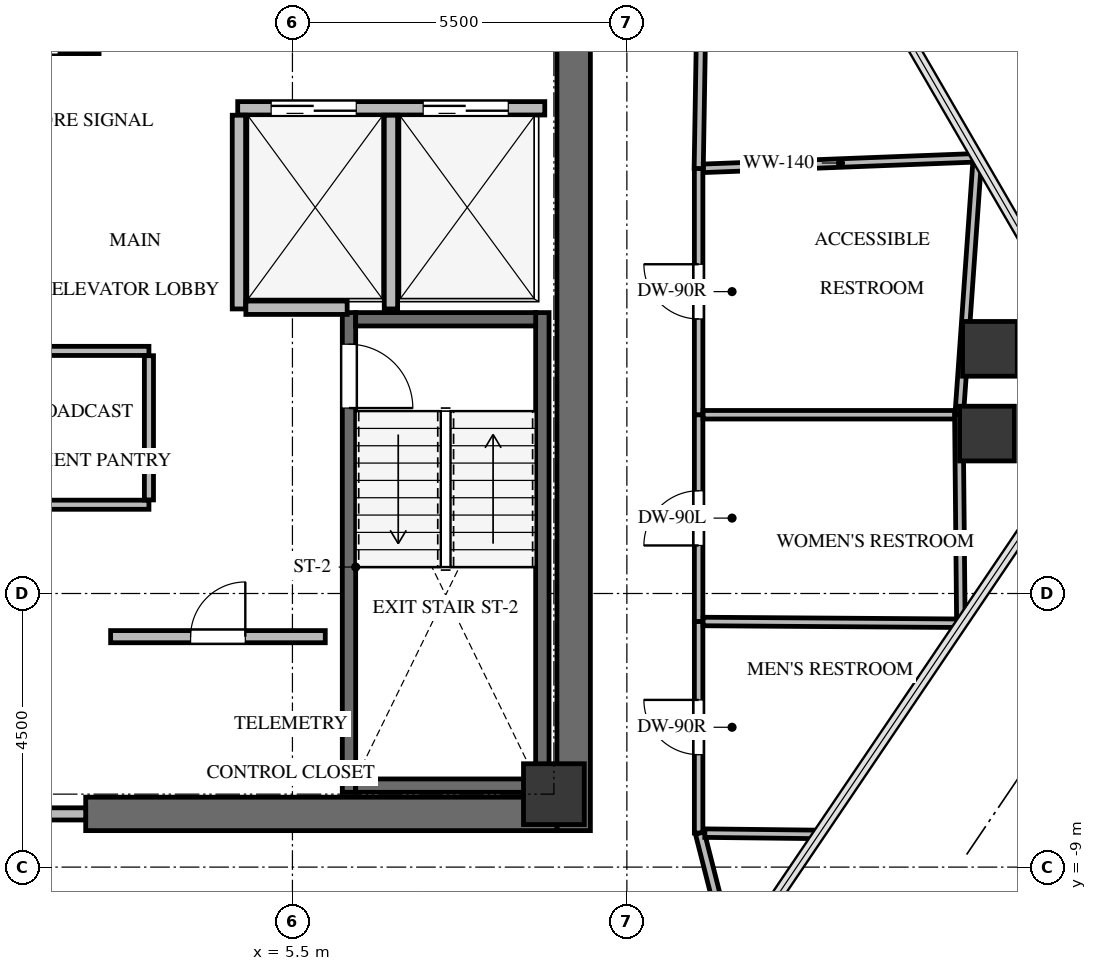
"""IFC4 building model, lengths in metres.
Left out: names, types, materials, properties, quantities, classifications, styles, units other than length and angle.
Written with IfcOpenShell. Run it as: python <this file> out.ifc"""

import sys

from ifc_helpers import new_model, si_unit, direction, frame, frame_2d, origin, origin_2d, place, context, subcontext, project, spatial, rectangle, extrude, source, transform, mapped, element, fill, save


model = new_model("IFC4")
c1 = context("Model", 3, precision=1e-05, world=origin(), true_north=direction((0.0, 1.0)))
c2 = subcontext(c1, "Body", "Model", "MODEL_VIEW")
j1 = project(units=[si_unit("LENGTHUNIT", "METRE"), si_unit("PLANEANGLEUNIT", "RADIAN")], contexts=[c1])
p1 = place(None, origin())
s1 = spatial("IfcSite", under=j1, at=p1, CompositionType="ELEMENT")
p2 = place(p1, origin())
s2 = spatial("IfcBuilding", under=s1, at=p2, CompositionType="ELEMENT")
p3 = place(p2, frame((0.0, 0.0, 221.6)))
s3 = spatial("IfcBuildingStorey", under=s2, at=p3, CompositionType="ELEMENT", Elevation=221.6)
p4 = place(p3, frame((10.125, -8.4, 0.0), z_axis=(0.0, 0.0, 1.0), x_axis=(0.0, 1.0, 0.0)))
e1 = element("IfcWall", 1, at=p4, inside=s3, PredefinedType="SHEAR", context=c2, shape_type="SweptSolid", body=[
    extrude(rectangle(XDim=16.8, YDim=0.55, at=frame_2d((8.4, 0.0))), origin(), (0.0, 0.0, 1.0), 3.3),
])
p5 = place(p3, frame((2.1, -8.125, 0.0), z_axis=(0.0, 0.0, 1.0), x_axis=(1.0, 0.0, 0.0)))
e2 = element("IfcWall", 2, at=p5, inside=s3, PredefinedType="SHEAR", context=c2, shape_type="SweptSolid", body=[
    extrude(rectangle(XDim=7.75, YDim=0.55, at=frame_2d((3.875, 0.0))), origin(), (0.0, 0.0, 1.0), 3.3),
])
p6 = place(p3, frame((9.61, -7.77, -0.24), z_axis=(0.0, 0.0, 1.0), x_axis=(0.0, 1.0, 0.0)))
e3 = element("IfcWall", 3, at=p6, inside=s3, PredefinedType="SHEAR", context=c2, shape_type="SweptSolid", body=[
    extrude(rectangle(XDim=7.89, YDim=0.22, at=frame_2d((3.945, 0.0))), origin(), (0.0, 0.0, 1.0), 3.3),
])
p7 = place(p3, frame((6.43, 0.12, -0.24), z_axis=(0.0, 0.0, 1.0), x_axis=(0.0, -1.0, 0.0)))
e4 = element("IfcWall", 4, at=p7, inside=s3, PredefinedType="SHEAR", context=c2, shape_type="SweptSolid", body=[
    extrude(rectangle(XDim=7.89, YDim=0.22, at=frame_2d((3.945, 0.0))), origin(), (0.0, 0.0, 1.0), 3.3),
])
p8 = place(p7, frame((0.52, 0.0, 0.0)))
e5 = element("IfcOpeningElement", 5, at=p8, cuts=e4, PredefinedType="OPENING", context=c2, shape_type="SweptSolid", body=[
    extrude(rectangle(XDim=1.05, YDim=2.15, at=frame_2d((0.525, 1.075))), frame((0.0, 0.12, 0.0), z_axis=(0.0, -1.0, 0.0), x_axis=(1.0, 0.0, 0.0)), (0.0, 0.0, 1.0), 0.24),
])
for number, where, z_axis, x_axis in (
    (6, (6.54, -7.66, -0.24), (0.0, 0.0, 1.0), (1.0, 0.0, 0.0)),
    (7, (9.5, 0.01, -0.24), (0.0, 0.0, 1.0), (-1.0, 0.0, 0.0)),
):
    element("IfcWall", number, at=place(p3, frame(where, z_axis=z_axis, x_axis=x_axis)), inside=s3, PredefinedType="SHEAR", context=c2, shape_type="SweptSolid", body=[
        extrude(rectangle(XDim=2.96, YDim=0.22, at=frame_2d((1.48, 0.0))), origin(), (0.0, 0.0, 1.0), 3.3),
    ])
p9 = place(p3, frame((2.21, 4.38, -0.24), z_axis=(0.0, 0.0, 1.0), x_axis=(0.0, 1.0, 0.0)))
e8 = element("IfcWall", 8, at=p9, inside=s3, PredefinedType="SHEAR", context=c2, shape_type="SweptSolid", body=[
    extrude(rectangle(XDim=3.4, YDim=0.22, at=frame_2d((1.7, 0.0))), origin(), (0.0, 0.0, 1.0), 3.3),
])
p10 = place(p3, frame((-5.25, 4.49, -0.24), z_axis=(0.0, 0.0, 1.0), x_axis=(1.0, 0.0, 0.0)))
e9 = element("IfcWall", 9, at=p10, inside=s3, PredefinedType="SHEAR", context=c2, shape_type="SweptSolid", body=[
    extrude(rectangle(XDim=7.35, YDim=0.22, at=frame_2d((3.675, 0.0))), origin(), (0.0, 0.0, 1.0), 3.3),
])
p11 = place(p10, frame((5.85, 0.0, 0.0)))
e10 = element("IfcOpeningElement", 10, at=p11, cuts=e9, PredefinedType="OPENING", context=c2, shape_type="SweptSolid", body=[
    extrude(rectangle(XDim=1.05, YDim=2.15, at=frame_2d((0.525, 1.075))), frame((0.0, 0.12, 0.0), z_axis=(0.0, -1.0, 0.0), x_axis=(1.0, 0.0, 0.0)), (0.0, 0.0, 1.0), 0.24),
])
m1 = source(origin(), c2, "Body", "SweptSolid", [
    extrude(rectangle(XDim=1.0, YDim=1.0, at=origin_2d()), origin(), (0.0, 0.0, 1.0), 3.3),
])
p12 = place(p3, frame((9.8, -7.8, -0.24), z_axis=(0.0, 0.0, 1.0), x_axis=(1.0, 0.0, 0.0)))
e11 = element("IfcColumn", 11, at=p12, inside=s3, PredefinedType="COLUMN", context=c2, shape_type="MappedRepresentation", body=[
    mapped(m1, transform((0.0, 0.0, 0.0), x_axis=(1.0, 0.0, 0.0), y_axis=(0.0, 1.0, 0.0), z_axis=(0.0, 0.0, 1.0), scale=1.0)),
])
m2 = source(origin(), c2, "Body", "SweptSolid", [
    extrude(rectangle(XDim=0.9, YDim=0.9, at=origin_2d()), origin(), (0.0, 0.0, 1.0), 3.3),
])
for number, where, z_axis, x_axis in (
    (12, (16.97, -0.476, -0.24), (0.0, 0.0, 1.0), (1.0, 0.0, 0.0)),
    (13, (16.922, -1.87, -0.24), (0.0, 0.0, 1.0), (1.0, 0.0, 0.0)),
):
    element("IfcColumn", number, at=place(p3, frame(where, z_axis=z_axis, x_axis=x_axis)), inside=s3, PredefinedType="COLUMN", context=c2, shape_type="MappedRepresentation", body=[
        mapped(m2, transform((0.0, 0.0, 0.0), x_axis=(1.0, 0.0, 0.0), y_axis=(0.0, 1.0, 0.0), z_axis=(0.0, 0.0, 1.0), scale=1.0)),
    ])
p13 = place(p3, frame((-2.1, -8.125, 0.0), z_axis=(0.0, 0.0, 1.0), x_axis=(1.0, 0.0, 0.0)))
e14 = element("IfcWall", 14, at=p13, inside=s3, PredefinedType="SOLIDWALL", context=c2, shape_type="SweptSolid", body=[
    extrude(rectangle(XDim=4.2, YDim=0.2, at=frame_2d((2.1, 0.0))), origin(), (0.0, 0.0, 1.0), 3.045),
])
p14 = place(p13, frame((1.2, 0.0, 0.0)))
e15 = element("IfcOpeningElement", 15, at=p14, cuts=e14, PredefinedType="OPENING", context=c2, shape_type="SweptSolid", body=[
    extrude(rectangle(XDim=1.8, YDim=2.15, at=frame_2d((0.9, 1.075))), frame((0.0, 0.11, 0.0), z_axis=(0.0, -1.0, 0.0), x_axis=(1.0, 0.0, 0.0)), (0.0, 0.0, 1.0), 0.22),
])
p15 = place(p3, frame((4.6, 3.48, 0.0), z_axis=(0.0, 0.0, 1.0), x_axis=(1.0, 0.0, 0.0)))
e16 = element("IfcWall", 16, at=p15, inside=s3, PredefinedType="SOLIDWALL", context=c2, shape_type="SweptSolid", body=[
    extrude(rectangle(XDim=5.05, YDim=0.22, at=frame_2d((2.525, 0.0))), origin(), (0.0, 0.0, 1.0), 3.045),
])
p16 = place(p15, frame((0.55, 0.0, 0.0)))
e17 = element("IfcOpeningElement", 17, at=p16, cuts=e16, PredefinedType="OPENING", context=c2, shape_type="SweptSolid", body=[
    extrude(rectangle(XDim=1.4, YDim=2.15, at=frame_2d((0.7, 1.075))), frame((0.0, 0.12, 0.0), z_axis=(0.0, -1.0, 0.0), x_axis=(1.0, 0.0, 0.0)), (0.0, 0.0, 1.0), 0.24),
])
p17 = place(p15, frame((3.05, 0.0, 0.0)))
e18 = element("IfcOpeningElement", 18, at=p17, cuts=e16, PredefinedType="OPENING", context=c2, shape_type="SweptSolid", body=[
    extrude(rectangle(XDim=1.4, YDim=2.15, at=frame_2d((0.7, 1.075))), frame((0.0, 0.12, 0.0), z_axis=(0.0, -1.0, 0.0), x_axis=(1.0, 0.0, 0.0)), (0.0, 0.0, 1.0), 0.24),
])
for number, where, z_axis, x_axis in (
    (19, (4.62, 0.18, 0.0), (0.0, 0.0, 1.0), (0.0, 1.0, 0.0)),
    (20, (7.12, 0.18, 0.0), (0.0, 0.0, 1.0), (0.0, 1.0, 0.0)),
):
    element("IfcWall", number, at=place(p3, frame(where, z_axis=z_axis, x_axis=x_axis)), inside=s3, PredefinedType="SOLIDWALL", context=c2, shape_type="SweptSolid", body=[
        extrude(rectangle(XDim=3.186, YDim=0.22, at=frame_2d((1.593, 0.0))), origin(), (0.0, 0.0, 1.0), 3.045),
    ])
p18 = place(p3, frame((4.734, 0.2, 0.0), z_axis=(0.0, 0.0, 1.0), x_axis=(1.0, 0.0, 0.0)))
e21 = element("IfcWall", 21, at=p18, inside=s3, PredefinedType="SOLIDWALL", context=c2, shape_type="SweptSolid", body=[
    extrude(rectangle(XDim=1.666, YDim=0.22, at=frame_2d((0.833, 0.0))), origin(), (0.0, 0.0, 1.0), 3.045),
])
p19 = place(p3, frame((2.51, -5.21, 0.0), z_axis=(0.0, 0.0, 1.0), x_axis=(1.0, 0.0, 0.0)))
e22 = element("IfcWall", 22, at=p19, inside=s3, PredefinedType="SOLIDWALL", context=c2, shape_type="SweptSolid", body=[
    extrude(rectangle(XDim=3.53, YDim=0.2, at=frame_2d((1.765, 0.0))), origin(), (0.0, 0.0, 1.0), 3.045),
])
p20 = place(p19, frame((1.315, 0.0, 0.0)))
e23 = element("IfcOpeningElement", 23, at=p20, cuts=e22, PredefinedType="OPENING", context=c2, shape_type="SweptSolid", body=[
    extrude(rectangle(XDim=0.9, YDim=2.05, at=frame_2d((0.45, 1.025))), frame((0.0, 0.11, 0.0), z_axis=(0.0, -1.0, 0.0), x_axis=(1.0, 0.0, 0.0)), (0.0, 0.0, 1.0), 0.22),
])
p21 = place(p3, frame((3.14, -3.04, 0.0), z_axis=(0.0, 0.0, 1.0), x_axis=(-1.0, 0.0, 0.0)))
e24 = element("IfcWall", 24, at=p21, inside=s3, PredefinedType="PARTITIONING", context=c2, shape_type="SweptSolid", body=[
    extrude(rectangle(XDim=7.48, YDim=0.15, at=frame_2d((3.74, 0.0))), origin(), (0.0, 0.0, 1.0), 3.045),
])
p22 = place(p21, frame((3.29, 0.0, 0.0)))
e25 = element("IfcOpeningElement", 25, at=p22, cuts=e24, PredefinedType="OPENING", context=c2, shape_type="SweptSolid", body=[
    extrude(rectangle(XDim=0.9, YDim=2.05, at=frame_2d((0.45, 1.025))), frame((0.0, 0.085, 0.0), z_axis=(0.0, -1.0, 0.0), x_axis=(1.0, 0.0, 0.0)), (0.0, 0.0, 1.0), 0.17),
])
p23 = place(p3, frame((-4.34, -0.51, 0.0), z_axis=(0.0, 0.0, 1.0), x_axis=(1.0, 0.0, 0.0)))
e26 = element("IfcWall", 26, at=p23, inside=s3, PredefinedType="PARTITIONING", context=c2, shape_type="SweptSolid", body=[
    extrude(rectangle(XDim=7.48, YDim=0.15, at=frame_2d((3.74, 0.0))), origin(), (0.0, 0.0, 1.0), 3.045),
])
p24 = place(p3, frame((3.14, -0.589, 0.0), z_axis=(0.0, 0.0, 1.0), x_axis=(0.0, -1.0, 0.0)))
e27 = element("IfcWall", 27, at=p24, inside=s3, PredefinedType="PARTITIONING", context=c2, shape_type="SweptSolid", body=[
    extrude(rectangle(XDim=2.372, YDim=0.15, at=frame_2d((1.186, 0.0))), origin(), (0.0, 0.0, 1.0), 3.045),
])
p25 = place(p3, frame((12.18, -8.44, 0.0), z_axis=(0.0, 0.0, 1.0), x_axis=(0.0, 1.0, 0.0)))
e28 = element("IfcWall", 28, at=p25, inside=s3, PredefinedType="PARTITIONING", context=c2, shape_type="SweptSolid", body=[
    extrude(rectangle(XDim=3.48, YDim=0.14, at=frame_2d((1.74, 0.0))), origin(), (0.0, 0.0, 1.0), 2.399),
])
p26 = place(p25, frame((1.29, 0.0, 0.0)))
e29 = element("IfcOpeningElement", 29, at=p26, cuts=e28, PredefinedType="OPENING", context=c2, shape_type="SweptSolid", body=[
    extrude(rectangle(XDim=0.9, YDim=2.05, at=frame_2d((0.45, 1.025))), frame((0.0, 0.08, 0.0), z_axis=(0.0, -1.0, 0.0), x_axis=(1.0, 0.0, 0.0)), (0.0, 0.0, 1.0), 0.16),
])
p27 = place(p3, frame((12.18, -4.96, 0.0), z_axis=(0.0, 0.0, 1.0), x_axis=(0.0, 1.0, 0.0)))
e30 = element("IfcWall", 30, at=p27, inside=s3, PredefinedType="PARTITIONING", context=c2, shape_type="SweptSolid", body=[
    extrude(rectangle(XDim=3.4, YDim=0.14, at=frame_2d((1.7, 0.0))), origin(), (0.0, 0.0, 1.0), 3.045),
])
p28 = place(p27, frame((1.25, 0.0, 0.0)))
e31 = element("IfcOpeningElement", 31, at=p28, cuts=e30, PredefinedType="OPENING", context=c2, shape_type="SweptSolid", body=[
    extrude(rectangle(XDim=0.9, YDim=2.05, at=frame_2d((0.45, 1.025))), frame((0.0, 0.08, 0.0), z_axis=(0.0, -1.0, 0.0), x_axis=(1.0, 0.0, 0.0)), (0.0, 0.0, 1.0), 0.16),
])
p29 = place(p3, frame((12.18, -1.56, 0.0), z_axis=(0.0, 0.0, 1.0), x_axis=(0.0, 1.0, 0.0)))
e32 = element("IfcWall", 32, at=p29, inside=s3, PredefinedType="PARTITIONING", context=c2, shape_type="SweptSolid", body=[
    extrude(rectangle(XDim=4.05, YDim=0.14, at=frame_2d((2.025, 0.0))), origin(), (0.0, 0.0, 1.0), 2.301),
])
p30 = place(p29, frame((1.575, 0.0, 0.0)))
e33 = element("IfcOpeningElement", 33, at=p30, cuts=e32, PredefinedType="OPENING", context=c2, shape_type="SweptSolid", body=[
    extrude(rectangle(XDim=0.9, YDim=2.05, at=frame_2d((0.45, 1.025))), frame((0.0, 0.08, 0.0), z_axis=(0.0, -1.0, 0.0), x_axis=(1.0, 0.0, 0.0)), (0.0, 0.0, 1.0), 0.16),
])
p31 = place(p3, frame((12.719, -10.478, 0.0), z_axis=(0.0, 0.0, 1.0), x_axis=(-0.246494896578, 0.96914408937, 0.0)))
e34 = element("IfcWall", 34, at=p31, inside=s3, PredefinedType="PARTITIONING", context=c2, shape_type="SweptSolid", body=[
    extrude(rectangle(XDim=2.103, YDim=0.15, at=frame_2d((1.051, 0.0))), origin(), (0.0, 0.0, 1.0), 2.399),
])
p32 = place(p3, frame((12.181, 2.49, 0.0), z_axis=(0.0, 0.0, 1.0), x_axis=(0.016828134389, 0.999858396921, 0.0)))
e35 = element("IfcWall", 35, at=p32, inside=s3, PredefinedType="PARTITIONING", context=c2, shape_type="SweptSolid", body=[
    extrude(rectangle(XDim=7.675, YDim=0.15, at=frame_2d((3.837, 0.0))), origin(), (0.0, 0.0, 1.0), 2.399),
])
p33 = place(p32, frame((3.377, 0.0, 0.0)))
e36 = element("IfcOpeningElement", 36, at=p33, cuts=e35, PredefinedType="OPENING", context=c2, shape_type="SweptSolid", body=[
    extrude(rectangle(XDim=0.92, YDim=2.1, at=frame_2d((0.46, 1.05))), frame((0.0, 0.085, 0.0), z_axis=(0.0, -1.0, 0.0), x_axis=(1.0, 0.0, 0.0)), (0.0, 0.0, 1.0), 0.17),
])
p34 = place(p3, frame((12.254, -4.96, 0.0), z_axis=(0.0, 0.0, 1.0), x_axis=(0.999976630429, -0.006836563198, 0.0)))
e37 = element("IfcWall", 37, at=p34, inside=s3, PredefinedType="PARTITIONING", context=c2, shape_type="SweptSolid", body=[
    extrude(rectangle(XDim=4.25, YDim=0.14, at=frame_2d((2.125, 0.0))), origin(), (0.0, 0.0, 1.0), 2.399),
])
p35 = place(p3, frame((14.156, -8.462, 0.0), z_axis=(0.0, 0.0, 1.0), x_axis=(-0.999935742613, 0.011336253532, 0.0)))
e38 = element("IfcWall", 38, at=p35, inside=s3, PredefinedType="PARTITIONING", context=c2, shape_type="SweptSolid", body=[
    extrude(rectangle(XDim=1.874, YDim=0.14, at=frame_2d((0.937, 0.0))), origin(), (0.0, 0.0, 1.0), 2.399),
])
p36 = place(p3, frame((12.254, -1.56, 0.0), z_axis=(0.0, 0.0, 1.0), x_axis=(1.0, 0.0, 0.0)))
e39 = element("IfcWall", 39, at=p36, inside=s3, PredefinedType="PARTITIONING", context=c2, shape_type="SweptSolid", body=[
    extrude(rectangle(XDim=4.206, YDim=0.14, at=frame_2d((2.103, 0.0))), origin(), (0.0, 0.0, 1.0), 2.301),
])
p37 = place(p3, frame((16.46, -1.56, 0.0), z_axis=(0.0, 0.0, 1.0), x_axis=(0.009604446748, -0.999953876238, 0.0)))
e40 = element("IfcWall", 40, at=p37, inside=s3, PredefinedType="PARTITIONING", context=c2, shape_type="SweptSolid", body=[
    extrude(rectangle(XDim=3.355, YDim=0.14, at=frame_2d((1.678, 0.0))), origin(), (0.0, 0.0, 1.0), 2.301),
])
p38 = place(p3, frame((12.26, 2.493, 0.0), z_axis=(0.0, 0.0, 1.0), x_axis=(0.999256206289, 0.038562082324, 0.0)))
e41 = element("IfcWall", 41, at=p38, inside=s3, PredefinedType="PARTITIONING", context=c2, shape_type="SweptSolid", body=[
    extrude(rectangle(XDim=4.508, YDim=0.14, at=frame_2d((2.254, 0.0))), origin(), (0.0, 0.0, 1.0), 2.399),
])
p39 = place(p3, frame((16.76, 2.593, 0.0), z_axis=(0.0, 0.0, 1.0), x_axis=(-0.07055102187, -0.997508172053, 0.0)))
e42 = element("IfcWall", 42, at=p39, inside=s3, PredefinedType="PARTITIONING", context=c2, shape_type="SweptSolid", body=[
    extrude(rectangle(XDim=4.163, YDim=0.14, at=frame_2d((2.082, 0.0))), origin(), (0.0, 0.0, 1.0), 2.301),
])
m3 = source(origin(), c2, "Body", "SweptSolid", [
    extrude(rectangle(XDim=1.05, YDim=2.15, at=frame_2d((0.525, 1.075))), frame((0.0, 0.025, 0.0), z_axis=(0.0, -1.0, 0.0), x_axis=(1.0, 0.0, 0.0)), (0.0, 0.0, 1.0), 0.05),
])
p40 = place(p8, origin())
e43 = element("IfcDoor", 43, at=p40, inside=s3, OperationType="SINGLE_SWING_RIGHT", PredefinedType="DOOR", context=c2, shape_type="MappedRepresentation", body=[
    mapped(m3, transform((0.0, 0.0, 0.0), x_axis=(1.0, 0.0, 0.0), y_axis=(0.0, 1.0, 0.0), z_axis=(0.0, 0.0, 1.0), scale=1.0)),
])
fill(e5, e43)
m4 = source(origin(), c2, "Body", "SweptSolid", [
    extrude(rectangle(XDim=1.4, YDim=2.15, at=frame_2d((0.7, 1.075))), frame((0.0, 0.025, 0.0), z_axis=(0.0, -1.0, 0.0), x_axis=(1.0, 0.0, 0.0)), (0.0, 0.0, 1.0), 0.05),
])
p41 = place(p16, origin())
e44 = element("IfcDoor", 44, at=p41, inside=s3, OperationType="DOUBLE_DOOR_SLIDING", PredefinedType="DOOR", context=c2, shape_type="MappedRepresentation", body=[
    mapped(m4, transform((0.0, 0.0, 0.0), x_axis=(1.0, 0.0, 0.0), y_axis=(0.0, 1.0, 0.0), z_axis=(0.0, 0.0, 1.0), scale=1.0)),
])
fill(e17, e44)
p42 = place(p17, origin())
e45 = element("IfcDoor", 45, at=p42, inside=s3, OperationType="DOUBLE_DOOR_SLIDING", PredefinedType="DOOR", context=c2, shape_type="MappedRepresentation", body=[
    mapped(m4, transform((0.0, 0.0, 0.0), x_axis=(1.0, 0.0, 0.0), y_axis=(0.0, 1.0, 0.0), z_axis=(0.0, 0.0, 1.0), scale=1.0)),
])
fill(e18, e45)
m5 = source(origin(), c2, "Body", "SweptSolid", [
    extrude(rectangle(XDim=0.9, YDim=2.05, at=frame_2d((0.45, 1.025))), frame((0.0, 0.025, 0.0), z_axis=(0.0, -1.0, 0.0), x_axis=(1.0, 0.0, 0.0)), (0.0, 0.0, 1.0), 0.05),
])
p43 = place(p20, origin())
e46 = element("IfcDoor", 46, at=p43, inside=s3, OperationType="SINGLE_SWING_RIGHT", PredefinedType="DOOR", context=c2, shape_type="MappedRepresentation", body=[
    mapped(m5, transform((0.0, 0.0, 0.0), x_axis=(1.0, 0.0, 0.0), y_axis=(0.0, 1.0, 0.0), z_axis=(0.0, 0.0, 1.0), scale=1.0)),
])
fill(e23, e46)
m6 = source(origin(), c2, "Body", "SweptSolid", [
    extrude(rectangle(XDim=0.9, YDim=2.05, at=frame_2d((0.45, 1.025))), frame((0.0, 0.025, 0.0), z_axis=(0.0, -1.0, 0.0), x_axis=(1.0, 0.0, 0.0)), (0.0, 0.0, 1.0), 0.05),
])
p44 = place(p26, origin())
e47 = element("IfcDoor", 47, at=p44, inside=s3, OperationType="SINGLE_SWING_RIGHT", PredefinedType="DOOR", context=c2, shape_type="MappedRepresentation", body=[
    mapped(m6, transform((0.0, 0.0, 0.0), x_axis=(1.0, 0.0, 0.0), y_axis=(0.0, 1.0, 0.0), z_axis=(0.0, 0.0, 1.0), scale=1.0)),
])
fill(e29, e47)
m7 = source(origin(), c2, "Body", "SweptSolid", [
    extrude(rectangle(XDim=0.9, YDim=2.05, at=frame_2d((0.45, 1.025))), frame((0.0, 0.025, 0.0), z_axis=(0.0, -1.0, 0.0), x_axis=(1.0, 0.0, 0.0)), (0.0, 0.0, 1.0), 0.05),
])
p45 = place(p28, origin())
e48 = element("IfcDoor", 48, at=p45, inside=s3, OperationType="SINGLE_SWING_LEFT", PredefinedType="DOOR", context=c2, shape_type="MappedRepresentation", body=[
    mapped(m7, transform((0.0, 0.0, 0.0), x_axis=(1.0, 0.0, 0.0), y_axis=(0.0, 1.0, 0.0), z_axis=(0.0, 0.0, 1.0), scale=1.0)),
])
fill(e31, e48)
p46 = place(p30, origin())
e49 = element("IfcDoor", 49, at=p46, inside=s3, OperationType="SINGLE_SWING_RIGHT", PredefinedType="DOOR", context=c2, shape_type="MappedRepresentation", body=[
    mapped(m6, transform((0.0, 0.0, 0.0), x_axis=(1.0, 0.0, 0.0), y_axis=(0.0, 1.0, 0.0), z_axis=(0.0, 0.0, 1.0), scale=1.0)),
])
fill(e33, e49)
save(model, sys.argv[1])
